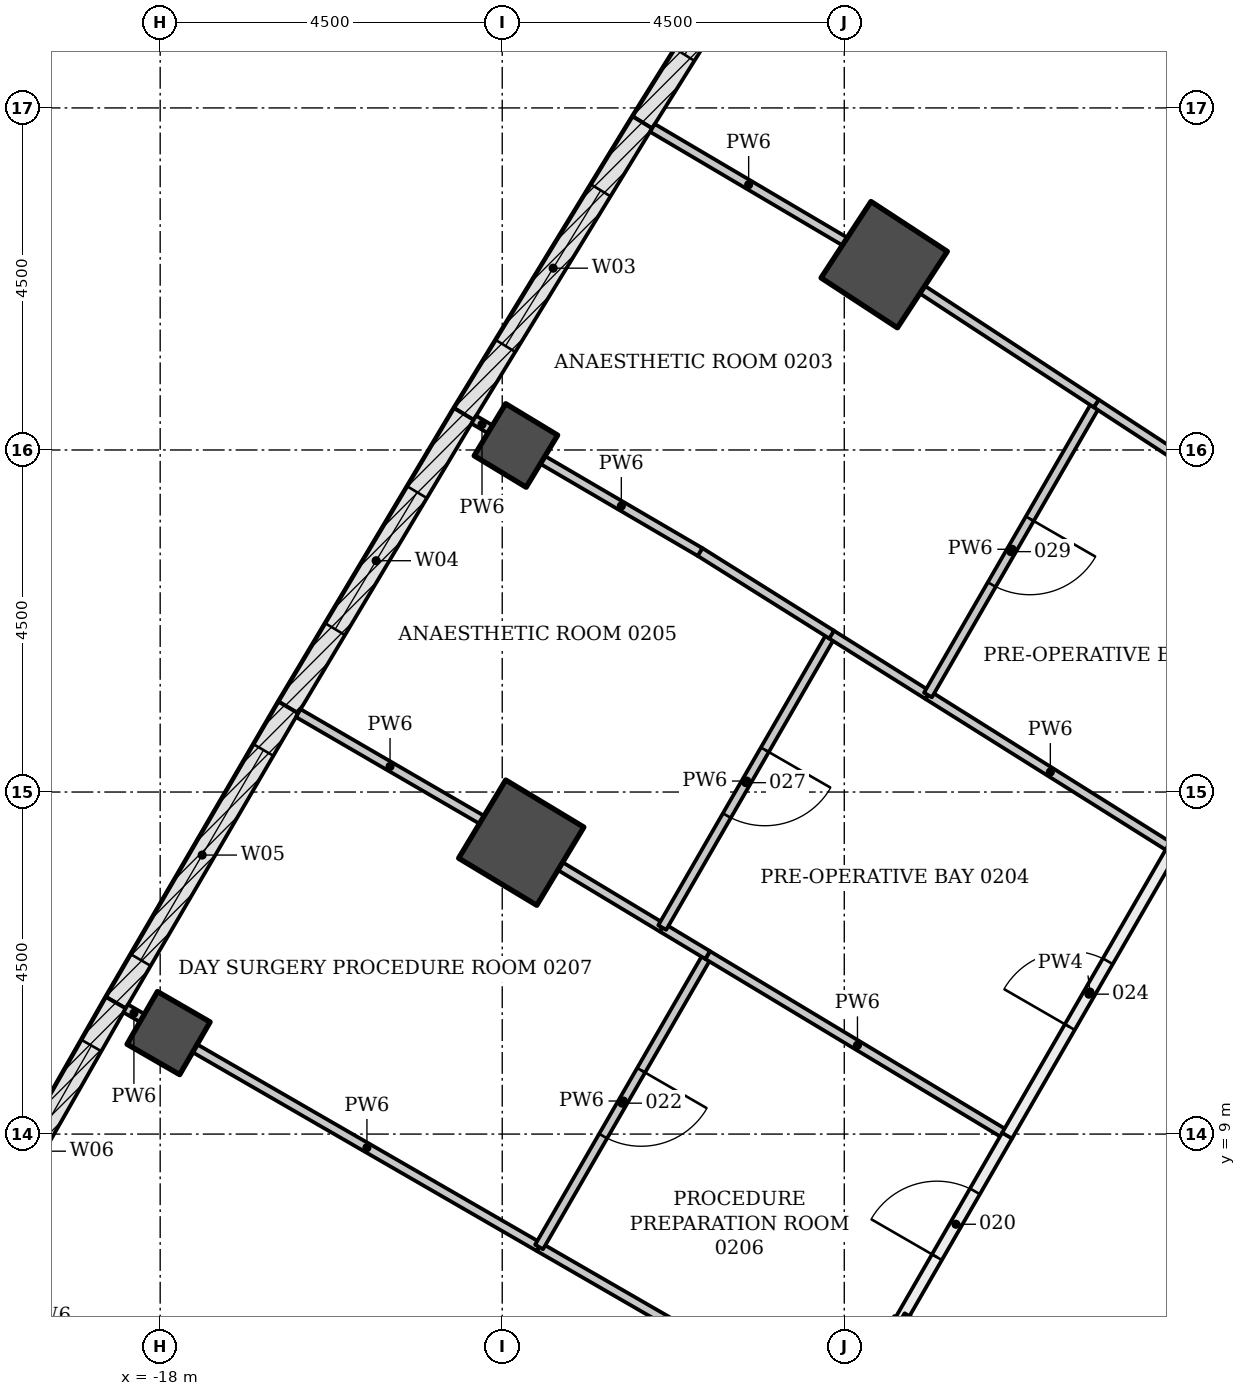
"""IFC4 building model, lengths in metres.
Left out: names, types, materials, properties, quantities, classifications, styles, units other than length and angle.
Written with IfcOpenShell. Run it as: python <this file> out.ifc"""

import sys

from ifc_helpers import new_model, si_unit, direction, frame, frame_2d, origin, origin_2d, place, context, subcontext, project, spatial, rectangle, extrude, element, fill, save


model = new_model("IFC4")
c1 = context("Model", 3, precision=1e-05, world=origin(), true_north=direction((0.0, 1.0)))
c2 = subcontext(c1, "Body", "Model", "MODEL_VIEW")
j1 = project(units=[si_unit("LENGTHUNIT", "METRE"), si_unit("PLANEANGLEUNIT", "RADIAN")], contexts=[c1])
p1 = place(None, origin())
s1 = spatial("IfcSite", under=j1, at=p1, CompositionType="ELEMENT")
p2 = place(p1, origin())
s2 = spatial("IfcBuilding", under=s1, at=p2, CompositionType="ELEMENT")
p3 = place(p2, frame((0.0, 0.0, 10.5)))
s3 = spatial("IfcBuildingStorey", under=s2, at=p3, CompositionType="ELEMENT", Elevation=10.5)
for number, where, z_axis, x_axis in (
    (1, (-8.475, 20.438, -0.25), (0.0, 0.0, 1.0), (-0.837, 0.547, 0.0)),
    (2, (-13.25, 12.834, -0.25), (0.0, 0.0, 1.0), (-0.857, 0.516, 0.0)),
):
    element("IfcColumn", number, at=place(p3, frame(where, z_axis=z_axis, x_axis=x_axis)), inside=s3, PredefinedType="COLUMN", context=c2, shape_type="SweptSolid", body=[
        extrude(rectangle(XDim=1.2, YDim=1.2, at=origin_2d()), origin(), (0.0, 0.0, 1.0), 4.5),
    ])
for number, where, z_axis, x_axis in (
    (3, (-13.32, 18.059, -0.25), (0.0, 0.0, 1.0), (-0.856, 0.518, 0.0)),
    (4, (-17.89, 10.329, -0.25), (0.0, 0.0, 1.0), (-0.866, 0.5, 0.0)),
):
    element("IfcColumn", number, at=place(p3, frame(where, z_axis=z_axis, x_axis=x_axis)), inside=s3, PredefinedType="COLUMN", context=c2, shape_type="SweptSolid", body=[
        extrude(rectangle(XDim=0.8, YDim=0.8, at=origin_2d()), origin(), (0.0, 0.0, 1.0), 4.5),
    ])
p4 = place(p3, frame((-1.083, 11.281, -0.25), z_axis=(0.0, 0.0, 1.0), x_axis=(-0.500001446645, -0.866024568562, 0.0)))
e5 = element("IfcWall", 5, at=p4, inside=s3, PredefinedType="SHEAR", context=c2, shape_type="SweptSolid", body=[
    extrude(rectangle(XDim=18.458, YDim=0.7, at=frame_2d((9.229, 0.0))), origin(), (0.0, 0.0, 1.0), 4.5),
])
p5 = place(p4, frame((8.979, 0.0, 0.25)))
e6 = element("IfcOpeningElement", 6, at=p5, cuts=e5, PredefinedType="OPENING", context=c2, shape_type="SweptSolid", body=[
    extrude(rectangle(XDim=1.2, YDim=2.1, at=frame_2d((0.6, 1.05))), frame((0.0, 0.36, 0.0), z_axis=(0.0, -1.0, 0.0), x_axis=(1.0, 0.0, 0.0)), (0.0, 0.0, 1.0), 0.72),
])
p6 = place(p4, frame((11.029, 0.0, 0.25)))
e7 = element("IfcOpeningElement", 7, at=p6, cuts=e5, PredefinedType="OPENING", context=c2, shape_type="SweptSolid", body=[
    extrude(rectangle(XDim=1.2, YDim=2.1, at=frame_2d((0.6, 1.05))), frame((0.0, 0.36, 0.0), z_axis=(0.0, -1.0, 0.0), x_axis=(1.0, 0.0, 0.0)), (0.0, 0.0, 1.0), 0.72),
])
p7 = place(p3, frame((-11.655, 22.311, 0.0), z_axis=(0.0, 0.0, 1.0), x_axis=(0.530804082031, 0.847494558389, 0.0)))
e8 = element("IfcWall", 8, at=p7, inside=s3, PredefinedType="NOTDEFINED", context=c2, shape_type="SweptSolid", body=[
    extrude(rectangle(XDim=4.496, YDim=0.3, at=frame_2d((2.248, 0.0))), origin(), (0.0, 0.0, 1.0), 4.25),
])
p8 = place(p7, frame((1.048, 0.0, 0.9)))
e9 = element("IfcOpeningElement", 9, at=p8, cuts=e8, PredefinedType="OPENING", context=c2, shape_type="SweptSolid", body=[
    extrude(rectangle(XDim=2.4, YDim=2.4, at=frame_2d((1.2, 1.2))), frame((0.0, 0.16, 0.0), z_axis=(0.0, -1.0, 0.0), x_axis=(1.0, 0.0, 0.0)), (0.0, 0.0, 1.0), 0.32),
])
p9 = place(p3, frame((-14.004, 18.475, 0.0), z_axis=(0.0, 0.0, 1.0), x_axis=(0.522078085402, 0.852897691838, 0.0)))
e10 = element("IfcWall", 10, at=p9, inside=s3, PredefinedType="NOTDEFINED", context=c2, shape_type="SweptSolid", body=[
    extrude(rectangle(XDim=4.496, YDim=0.3, at=frame_2d((2.248, 0.0))), origin(), (0.0, 0.0, 1.0), 4.25),
])
p10 = place(p9, frame((1.048, 0.0, 0.9)))
e11 = element("IfcOpeningElement", 11, at=p10, cuts=e10, PredefinedType="OPENING", context=c2, shape_type="SweptSolid", body=[
    extrude(rectangle(XDim=2.4, YDim=2.4, at=frame_2d((1.2, 1.2))), frame((0.0, 0.16, 0.0), z_axis=(0.0, -1.0, 0.0), x_axis=(1.0, 0.0, 0.0)), (0.0, 0.0, 1.0), 0.32),
])
p11 = place(p3, frame((-16.313, 14.614, 0.0), z_axis=(0.0, 0.0, 1.0), x_axis=(0.513257465408, 0.858234684805, 0.0)))
e12 = element("IfcWall", 12, at=p11, inside=s3, PredefinedType="NOTDEFINED", context=c2, shape_type="SweptSolid", body=[
    extrude(rectangle(XDim=4.496, YDim=0.3, at=frame_2d((2.248, 0.0))), origin(), (0.0, 0.0, 1.0), 4.25),
])
p12 = place(p11, frame((1.198, 0.0, 0.8)))
e13 = element("IfcOpeningElement", 13, at=p12, cuts=e12, PredefinedType="OPENING", context=c2, shape_type="SweptSolid", body=[
    extrude(rectangle(XDim=2.1, YDim=3.0, at=frame_2d((1.05, 1.5))), frame((0.0, 0.16, 0.0), z_axis=(0.0, -1.0, 0.0), x_axis=(1.0, 0.0, 0.0)), (0.0, 0.0, 1.0), 0.32),
])
p13 = place(p3, frame((-18.582, 10.73, 0.0), z_axis=(0.0, 0.0, 1.0), x_axis=(0.50445499627, 0.86343798662, 0.0)))
e14 = element("IfcWall", 14, at=p13, inside=s3, PredefinedType="NOTDEFINED", context=c2, shape_type="SweptSolid", body=[
    extrude(rectangle(XDim=4.496, YDim=0.3, at=frame_2d((2.248, 0.0))), origin(), (0.0, 0.0, 1.0), 4.25),
])
p14 = place(p13, frame((0.648, 0.0, 0.8)))
e15 = element("IfcOpeningElement", 15, at=p14, cuts=e14, PredefinedType="OPENING", context=c2, shape_type="SweptSolid", body=[
    extrude(rectangle(XDim=3.2, YDim=2.7, at=frame_2d((1.6, 1.35))), frame((0.0, 0.16, 0.0), z_axis=(0.0, -1.0, 0.0), x_axis=(1.0, 0.0, 0.0)), (0.0, 0.0, 1.0), 0.32),
])
p15 = place(p3, frame((-20.811, 6.823, 0.0), z_axis=(0.0, 0.0, 1.0), x_axis=(0.495524760411, 0.868593812907, 0.0)))
e16 = element("IfcWall", 16, at=p15, inside=s3, PredefinedType="NOTDEFINED", context=c2, shape_type="SweptSolid", body=[
    extrude(rectangle(XDim=4.496, YDim=0.3, at=frame_2d((2.248, 0.0))), origin(), (0.0, 0.0, 1.0), 4.25),
])
p16 = place(p15, frame((0.648, 0.0, 0.8)))
e17 = element("IfcOpeningElement", 17, at=p16, cuts=e16, PredefinedType="OPENING", context=c2, shape_type="SweptSolid", body=[
    extrude(rectangle(XDim=3.2, YDim=2.7, at=frame_2d((1.6, 1.35))), frame((0.0, 0.16, 0.0), z_axis=(0.0, -1.0, 0.0), x_axis=(1.0, 0.0, 0.0)), (0.0, 0.0, 1.0), 0.32),
])
p17 = place(p3, frame((0.176, 6.711, 0.0), z_axis=(0.0, 0.0, 1.0), x_axis=(-0.500004227369, -0.866022963098, 0.0)))
e18 = element("IfcWall", 18, at=p17, inside=s3, PredefinedType="PARTITIONING", context=c2, shape_type="SweptSolid", body=[
    extrude(rectangle(XDim=11.8, YDim=0.25, at=frame_2d((5.9, 0.0))), origin(), (0.0, 0.0, 1.0), 4.25),
])
p18 = place(p3, frame((-18.26, 5.356, 0.0), z_axis=(0.0, 0.0, 1.0), x_axis=(-0.867283853893, 0.49781393791, 0.0)))
e19 = element("IfcWall", 19, at=p18, inside=s3, PredefinedType="PARTITIONING", context=c2, shape_type="SweptSolid", body=[
    extrude(rectangle(XDim=2.792, YDim=0.12, at=frame_2d((1.396, 0.0))), origin(), (0.0, 0.0, 1.0), 3.633),
])
p19 = place(p3, frame((-8.256, 6.556, 0.0), z_axis=(0.0, 0.0, 1.0), x_axis=(-0.499904469662, -0.866080551226, 0.0)))
e20 = element("IfcWall", 20, at=p19, inside=s3, PredefinedType="PARTITIONING", context=c2, shape_type="SweptSolid", body=[
    extrude(rectangle(XDim=1.548, YDim=0.2, at=frame_2d((0.774, 0.0))), origin(), (0.0, 0.0, 1.0), 3.638),
])
p20 = place(p3, frame((-5.226, 4.806, 0.0), z_axis=(0.0, 0.0, 1.0), x_axis=(-0.865949687125, 0.500131122175, 0.0)))
e21 = element("IfcWall", 21, at=p20, inside=s3, PredefinedType="PARTITIONING", context=c2, shape_type="SweptSolid", body=[
    extrude(rectangle(XDim=3.499, YDim=0.2, at=frame_2d((1.75, 0.0))), origin(), (0.0, 0.0, 1.0), 4.25),
])
p21 = place(p20, frame((0.95, 0.0, 0.0)))
e22 = element("IfcOpeningElement", 22, at=p21, cuts=e21, PredefinedType="OPENING", context=c2, shape_type="SweptSolid", body=[
    extrude(rectangle(XDim=1.5, YDim=2.1, at=frame_2d((0.75, 1.05))), frame((0.0, 0.11, 0.0), z_axis=(0.0, -1.0, 0.0), x_axis=(1.0, 0.0, 0.0)), (0.0, 0.0, 1.0), 0.22),
])
p22 = place(p3, frame((-9.032, 5.215, 0.0), z_axis=(0.0, 0.0, 1.0), x_axis=(-0.866130767322, 0.499817460578, 0.0)))
e23 = element("IfcWall", 23, at=p22, inside=s3, PredefinedType="PARTITIONING", context=c2, shape_type="SweptSolid", body=[
    extrude(rectangle(XDim=4.597, YDim=0.12, at=frame_2d((2.299, 0.0))), origin(), (0.0, 0.0, 1.0), 3.638),
])
p23 = place(p3, frame((-18.237, 10.528, 0.0), z_axis=(0.0, 0.0, 1.0), x_axis=(-0.866558586415, 0.499075361355, 0.0)))
e24 = element("IfcWall", 24, at=p23, inside=s3, PredefinedType="PARTITIONING", context=c2, shape_type="SweptSolid", body=[
    extrude(rectangle(XDim=0.25, YDim=0.12, at=frame_2d((0.125, 0.0))), origin(), (0.0, 0.0, 1.0), 4.25),
])
p24 = place(p3, frame((-13.017, 7.515, 0.0), z_axis=(0.0, 0.0, 1.0), x_axis=(-0.866023771128, 0.500002827834, 0.0)))
e25 = element("IfcWall", 25, at=p24, inside=s3, PredefinedType="PARTITIONING", context=c2, shape_type="SweptSolid", body=[
    extrude(rectangle(XDim=5.226, YDim=0.12, at=frame_2d((2.613, 0.0))), origin(), (0.0, 0.0, 1.0), 3.638),
])
p25 = place(p3, frame((-10.797, 11.355, 0.0), z_axis=(0.0, 0.0, 1.0), x_axis=(-0.500117989508, -0.865957271793, 0.0)))
e26 = element("IfcWall", 26, at=p25, inside=s3, PredefinedType="PARTITIONING", context=c2, shape_type="SweptSolid", body=[
    extrude(rectangle(XDim=4.435, YDim=0.12, at=frame_2d((2.217, 0.0))), origin(), (0.0, 0.0, 1.0), 3.638),
])
p26 = place(p25, frame((1.75, 0.0, 0.0)))
e27 = element("IfcOpeningElement", 27, at=p26, cuts=e26, PredefinedType="OPENING", context=c2, shape_type="SweptSolid", body=[
    extrude(rectangle(XDim=1.0, YDim=2.1, at=frame_2d((0.5, 1.05))), frame((0.0, 0.07, 0.0), z_axis=(0.0, -1.0, 0.0), x_axis=(1.0, 0.0, 0.0)), (0.0, 0.0, 1.0), 0.14),
])
p27 = place(p3, frame((-6.857, 8.983, 0.0), z_axis=(0.0, 0.0, 1.0), x_axis=(-0.856751730158, 0.515729069251, 0.0)))
e28 = element("IfcWall", 28, at=p27, inside=s3, PredefinedType="PARTITIONING", context=c2, shape_type="SweptSolid", body=[
    extrude(rectangle(XDim=4.598, YDim=0.12, at=frame_2d((2.299, 0.0))), origin(), (0.0, 0.0, 1.0), 3.638),
])
p28 = place(p3, frame((-8.256, 6.558, 0.0), z_axis=(0.0, 0.0, 1.0), x_axis=(0.500081734942, 0.86597820895, 0.0)))
e29 = element("IfcWall", 29, at=p28, inside=s3, PredefinedType="PARTITIONING", context=c2, shape_type="SweptSolid", body=[
    extrude(rectangle(XDim=2.804, YDim=0.15, at=frame_2d((1.402, 0.0))), origin(), (0.0, 0.0, 1.0), 3.638),
])
p29 = place(p28, frame((0.95, 0.0, 0.0)))
e30 = element("IfcOpeningElement", 30, at=p29, cuts=e29, PredefinedType="OPENING", context=c2, shape_type="SweptSolid", body=[
    extrude(rectangle(XDim=1.0, YDim=2.1, at=frame_2d((0.5, 1.05))), frame((0.0, 0.085, 0.0), z_axis=(0.0, -1.0, 0.0), x_axis=(1.0, 0.0, 0.0)), (0.0, 0.0, 1.0), 0.17),
])
p30 = place(p3, frame((-10.798, 11.356, 0.0), z_axis=(0.0, 0.0, 1.0), x_axis=(-0.856627537291, 0.515935327686, 0.0)))
e31 = element("IfcWall", 31, at=p30, inside=s3, PredefinedType="PARTITIONING", context=c2, shape_type="SweptSolid", body=[
    extrude(rectangle(XDim=0.698, YDim=0.12, at=frame_2d((0.349, 0.0))), origin(), (0.0, 0.0, 1.0), 3.638),
])
p31 = place(p3, frame((-13.769, 13.135, 0.0), z_axis=(0.0, 0.0, 1.0), x_axis=(-0.864576979504, 0.50250039454, 0.0)))
e32 = element("IfcWall", 32, at=p31, inside=s3, PredefinedType="PARTITIONING", context=c2, shape_type="SweptSolid", body=[
    extrude(rectangle(XDim=2.792, YDim=0.12, at=frame_2d((1.396, 0.0))), origin(), (0.0, 0.0, 1.0), 3.633),
])
p32 = place(p3, frame((-11.397, 11.717, 0.0), z_axis=(0.0, 0.0, 1.0), x_axis=(-0.85652691333, 0.516102360721, 0.0)))
e33 = element("IfcWall", 33, at=p32, inside=s3, PredefinedType="PARTITIONING", context=c2, shape_type="SweptSolid", body=[
    extrude(rectangle(XDim=1.563, YDim=0.12, at=frame_2d((0.782, 0.0))), origin(), (0.0, 0.0, 1.0), 3.638),
])
p33 = place(p3, frame((-6.858, 8.979, 0.0), z_axis=(0.0, 0.0, 1.0), x_axis=(0.500105111742, 0.865964708986, 0.0)))
e34 = element("IfcWall", 34, at=p33, inside=s3, PredefinedType="PARTITIONING", context=c2, shape_type="SweptSolid", body=[
    extrude(rectangle(XDim=4.363, YDim=0.15, at=frame_2d((2.181, 0.0))), origin(), (0.0, 0.0, 1.0), 3.638),
])
p34 = place(p33, frame((1.65, 0.0, 0.0)))
e35 = element("IfcOpeningElement", 35, at=p34, cuts=e34, PredefinedType="OPENING", context=c2, shape_type="SweptSolid", body=[
    extrude(rectangle(XDim=1.0, YDim=2.1, at=frame_2d((0.5, 1.05))), frame((0.0, 0.085, 0.0), z_axis=(0.0, -1.0, 0.0), x_axis=(1.0, 0.0, 0.0)), (0.0, 0.0, 1.0), 0.17),
])
p35 = place(p3, frame((-9.17, 15.572, 0.0), z_axis=(0.0, 0.0, 1.0), x_axis=(-0.499902881486, -0.866081467924, 0.0)))
e36 = element("IfcWall", 36, at=p35, inside=s3, PredefinedType="PARTITIONING", context=c2, shape_type="SweptSolid", body=[
    extrude(rectangle(XDim=4.451, YDim=0.12, at=frame_2d((2.226, 0.0))), origin(), (0.0, 0.0, 1.0), 3.638),
])
p36 = place(p35, frame((1.75, 0.0, 0.0)))
e37 = element("IfcOpeningElement", 37, at=p36, cuts=e36, PredefinedType="OPENING", context=c2, shape_type="SweptSolid", body=[
    extrude(rectangle(XDim=1.0, YDim=2.1, at=frame_2d((0.5, 1.05))), frame((0.0, 0.07, 0.0), z_axis=(0.0, -1.0, 0.0), x_axis=(1.0, 0.0, 0.0)), (0.0, 0.0, 1.0), 0.14),
])
p37 = place(p3, frame((-4.68, 12.753, 0.0), z_axis=(0.0, 0.0, 1.0), x_axis=(-0.846844902979, 0.531839929206, 0.0)))
e38 = element("IfcWall", 38, at=p37, inside=s3, PredefinedType="PARTITIONING", context=c2, shape_type="SweptSolid", body=[
    extrude(rectangle(XDim=3.8, YDim=0.12, at=frame_2d((1.9, 0.0))), origin(), (0.0, 0.0, 1.0), 3.638),
])
p38 = place(p3, frame((-7.901, 14.776, 0.0), z_axis=(0.0, 0.0, 1.0), x_axis=(-0.847002237732, 0.531589323892, 0.0)))
e39 = element("IfcWall", 39, at=p38, inside=s3, PredefinedType="PARTITIONING", context=c2, shape_type="SweptSolid", body=[
    extrude(rectangle(XDim=1.503, YDim=0.12, at=frame_2d((0.751, 0.0))), origin(), (0.0, 0.0, 1.0), 3.638),
])
p39 = place(p3, frame((-13.658, 18.273, 0.0), z_axis=(0.0, 0.0, 1.0), x_axis=(-0.863885093979, 0.503688936151, 0.0)))
e40 = element("IfcWall", 40, at=p39, inside=s3, PredefinedType="PARTITIONING", context=c2, shape_type="SweptSolid", body=[
    extrude(rectangle(XDim=0.25, YDim=0.12, at=frame_2d((0.125, 0.0))), origin(), (0.0, 0.0, 1.0), 4.25),
])
p40 = place(p3, frame((-9.166, 15.571, 0.0), z_axis=(0.0, 0.0, 1.0), x_axis=(-0.84701751501, 0.531564981227, 0.0)))
e41 = element("IfcWall", 41, at=p40, inside=s3, PredefinedType="PARTITIONING", context=c2, shape_type="SweptSolid", body=[
    extrude(rectangle(XDim=2.045, YDim=0.12, at=frame_2d((1.022, 0.0))), origin(), (0.0, 0.0, 1.0), 3.638),
])
p41 = place(p3, frame((-10.898, 16.658, 0.0), z_axis=(0.0, 0.0, 1.0), x_axis=(-0.863161652457, 0.504927679701, 0.0)))
e42 = element("IfcWall", 42, at=p41, inside=s3, PredefinedType="PARTITIONING", context=c2, shape_type="SweptSolid", body=[
    extrude(rectangle(XDim=2.398, YDim=0.12, at=frame_2d((1.199, 0.0))), origin(), (0.0, 0.0, 1.0), 3.638),
])
p42 = place(p3, frame((-5.684, 18.611, 0.0), z_axis=(0.0, 0.0, 1.0), x_axis=(-0.500099413844, -0.865967999567, 0.0)))
e43 = element("IfcWall", 43, at=p42, inside=s3, PredefinedType="PARTITIONING", context=c2, shape_type="SweptSolid", body=[
    extrude(rectangle(XDim=4.429, YDim=0.12, at=frame_2d((2.214, 0.0))), origin(), (0.0, 0.0, 1.0), 3.638),
])
p43 = place(p42, frame((1.75, 0.0, 0.0)))
e44 = element("IfcOpeningElement", 44, at=p43, cuts=e43, PredefinedType="OPENING", context=c2, shape_type="SweptSolid", body=[
    extrude(rectangle(XDim=1.0, YDim=2.1, at=frame_2d((0.5, 1.05))), frame((0.0, 0.07, 0.0), z_axis=(0.0, -1.0, 0.0), x_axis=(1.0, 0.0, 0.0)), (0.0, 0.0, 1.0), 0.14),
])
p44 = place(p3, frame((-2.252, 16.367, 0.0), z_axis=(0.0, 0.0, 1.0), x_axis=(-0.836925574982, 0.547316710819, 0.0)))
e45 = element("IfcWall", 45, at=p44, inside=s3, PredefinedType="PARTITIONING", context=c2, shape_type="SweptSolid", body=[
    extrude(rectangle(XDim=4.102, YDim=0.12, at=frame_2d((2.051, 0.0))), origin(), (0.0, 0.0, 1.0), 3.638),
])
p45 = place(p3, frame((-8.992, 20.743, 0.0), z_axis=(0.0, 0.0, 1.0), x_axis=(-0.861228913487, 0.508217235613, 0.0)))
e46 = element("IfcWall", 46, at=p45, inside=s3, PredefinedType="PARTITIONING", context=c2, shape_type="SweptSolid", body=[
    extrude(rectangle(XDim=2.94, YDim=0.12, at=frame_2d((1.47, 0.0))), origin(), (0.0, 0.0, 1.0), 3.633),
])
p46 = place(p3, frame((-5.685, 18.612, 0.0), z_axis=(0.0, 0.0, 1.0), x_axis=(-0.836813840242, 0.547487531163, 0.0)))
e47 = element("IfcWall", 47, at=p46, inside=s3, PredefinedType="PARTITIONING", context=c2, shape_type="SweptSolid", body=[
    extrude(rectangle(XDim=2.734, YDim=0.12, at=frame_2d((1.367, 0.0))), origin(), (0.0, 0.0, 1.0), 3.638),
])
p47 = place(p8, origin())
e48 = element("IfcWindow", 48, at=p47, inside=s3, PartitioningType="DOUBLE_PANEL_VERTICAL", PredefinedType="WINDOW", context=c2, shape_type="SweptSolid", body=[
    extrude(rectangle(XDim=2.4, YDim=2.4, at=frame_2d((1.2, 1.2))), frame((0.0, 0.03, 0.0), z_axis=(0.0, -1.0, 0.0), x_axis=(1.0, 0.0, 0.0)), (0.0, 0.0, 1.0), 0.06),
])
fill(e9, e48)
p48 = place(p10, origin())
e49 = element("IfcWindow", 49, at=p48, inside=s3, PartitioningType="DOUBLE_PANEL_VERTICAL", PredefinedType="WINDOW", context=c2, shape_type="SweptSolid", body=[
    extrude(rectangle(XDim=2.4, YDim=2.4, at=frame_2d((1.2, 1.2))), frame((0.0, 0.03, 0.0), z_axis=(0.0, -1.0, 0.0), x_axis=(1.0, 0.0, 0.0)), (0.0, 0.0, 1.0), 0.06),
])
fill(e11, e49)
p49 = place(p12, origin())
e50 = element("IfcWindow", 50, at=p49, inside=s3, PartitioningType="DOUBLE_PANEL_HORIZONTAL", PredefinedType="WINDOW", context=c2, shape_type="SweptSolid", body=[
    extrude(rectangle(XDim=2.1, YDim=3.0, at=frame_2d((1.05, 1.5))), frame((0.0, 0.03, 0.0), z_axis=(0.0, -1.0, 0.0), x_axis=(1.0, 0.0, 0.0)), (0.0, 0.0, 1.0), 0.06),
])
fill(e13, e50)
p50 = place(p14, origin())
e51 = element("IfcWindow", 51, at=p50, inside=s3, PartitioningType="TRIPLE_PANEL_VERTICAL", PredefinedType="WINDOW", context=c2, shape_type="SweptSolid", body=[
    extrude(rectangle(XDim=3.2, YDim=2.7, at=frame_2d((1.6, 1.35))), frame((0.0, 0.03, 0.0), z_axis=(0.0, -1.0, 0.0), x_axis=(1.0, 0.0, 0.0)), (0.0, 0.0, 1.0), 0.06),
])
fill(e15, e51)
p51 = place(p16, origin())
e52 = element("IfcWindow", 52, at=p51, inside=s3, PartitioningType="TRIPLE_PANEL_VERTICAL", PredefinedType="WINDOW", context=c2, shape_type="SweptSolid", body=[
    extrude(rectangle(XDim=3.2, YDim=2.7, at=frame_2d((1.6, 1.35))), frame((0.0, 0.03, 0.0), z_axis=(0.0, -1.0, 0.0), x_axis=(1.0, 0.0, 0.0)), (0.0, 0.0, 1.0), 0.06),
])
fill(e17, e52)
p52 = place(p29, origin())
e53 = element("IfcDoor", 53, at=p52, inside=s3, OperationType="SINGLE_SWING_RIGHT", PredefinedType="DOOR", context=c2, shape_type="SweptSolid", body=[
    extrude(rectangle(XDim=1.0, YDim=2.1, at=frame_2d((0.5, 1.05))), frame((0.0, 0.025, 0.0), z_axis=(0.0, -1.0, 0.0), x_axis=(1.0, 0.0, 0.0)), (0.0, 0.0, 1.0), 0.05),
])
fill(e30, e53)
p53 = place(p26, origin())
e54 = element("IfcDoor", 54, at=p53, inside=s3, OperationType="SINGLE_SWING_LEFT", PredefinedType="DOOR", context=c2, shape_type="SweptSolid", body=[
    extrude(rectangle(XDim=1.0, YDim=2.1, at=frame_2d((0.5, 1.05))), frame((0.0, 0.025, 0.0), z_axis=(0.0, -1.0, 0.0), x_axis=(1.0, 0.0, 0.0)), (0.0, 0.0, 1.0), 0.05),
])
fill(e27, e54)
p54 = place(p34, origin())
e55 = element("IfcDoor", 55, at=p54, inside=s3, OperationType="SINGLE_SWING_LEFT", PredefinedType="DOOR", context=c2, shape_type="SweptSolid", body=[
    extrude(rectangle(XDim=1.0, YDim=2.1, at=frame_2d((0.5, 1.05))), frame((0.0, 0.025, 0.0), z_axis=(0.0, -1.0, 0.0), x_axis=(1.0, 0.0, 0.0)), (0.0, 0.0, 1.0), 0.05),
])
fill(e35, e55)
p55 = place(p36, origin())
e56 = element("IfcDoor", 56, at=p55, inside=s3, OperationType="SINGLE_SWING_LEFT", PredefinedType="DOOR", context=c2, shape_type="SweptSolid", body=[
    extrude(rectangle(XDim=1.0, YDim=2.1, at=frame_2d((0.5, 1.05))), frame((0.0, 0.025, 0.0), z_axis=(0.0, -1.0, 0.0), x_axis=(1.0, 0.0, 0.0)), (0.0, 0.0, 1.0), 0.05),
])
fill(e37, e56)
p56 = place(p43, origin())
e57 = element("IfcDoor", 57, at=p56, inside=s3, OperationType="SINGLE_SWING_LEFT", PredefinedType="DOOR", context=c2, shape_type="SweptSolid", body=[
    extrude(rectangle(XDim=1.0, YDim=2.1, at=frame_2d((0.5, 1.05))), frame((0.0, 0.025, 0.0), z_axis=(0.0, -1.0, 0.0), x_axis=(1.0, 0.0, 0.0)), (0.0, 0.0, 1.0), 0.05),
])
fill(e44, e57)
save(model, sys.argv[1])
